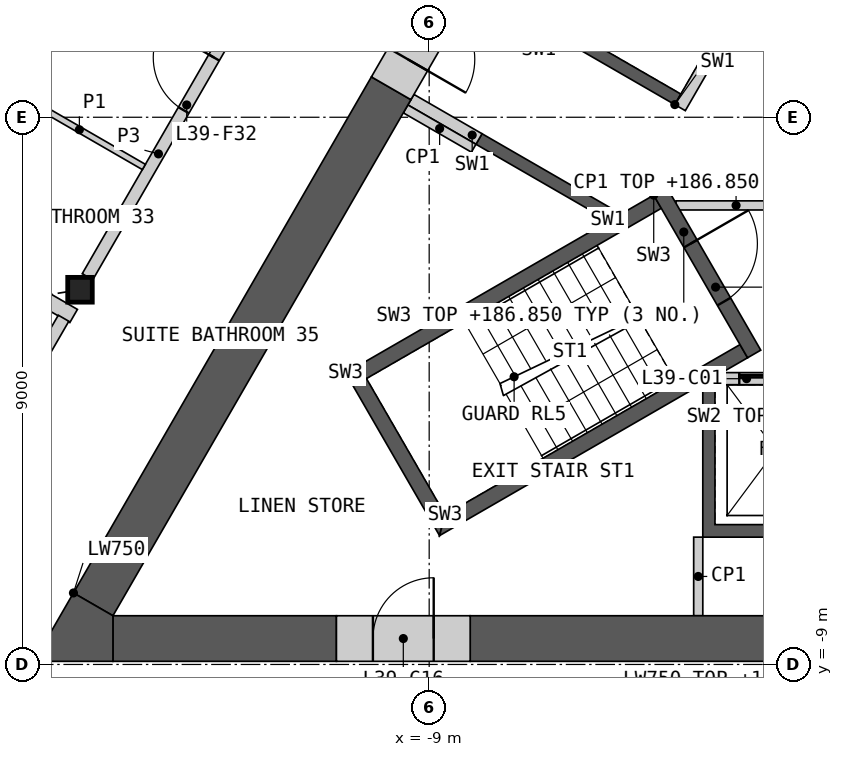
"""IFC4 building model, lengths in metres.
Left out: names, types, materials, properties, quantities, classifications, styles, units other than length and angle.
Written with IfcOpenShell. Run it as: python <this file> out.ifc"""

import sys

from ifc_helpers import new_model, si_unit, direction, frame, frame_2d, origin, origin_2d, place, context, subcontext, project, spatial, polyline, rectangle, i_section, outline, extrude, element, fill, save


model = new_model("IFC4")
c1 = context("Model", 3, precision=1e-05, world=origin(), true_north=direction((0.0, 1.0)))
c2 = subcontext(c1, "Body", "Model", "MODEL_VIEW")
j1 = project(units=[si_unit("LENGTHUNIT", "METRE"), si_unit("PLANEANGLEUNIT", "RADIAN")], contexts=[c1])
p1 = place(None, origin())
s1 = spatial("IfcSite", under=j1, at=p1, CompositionType="ELEMENT")
p2 = place(p1, origin())
s2 = spatial("IfcBuilding", under=s1, at=p2, CompositionType="ELEMENT")
p3 = place(p2, frame((0.0, 0.0, 183.6)))
s3 = spatial("IfcBuildingStorey", under=s2, at=p3, CompositionType="ELEMENT", Elevation=183.6)
p4 = place(p3, frame((-14.743, -2.837, 0.0), z_axis=(0.0, 0.0, 1.0), x_axis=(1.0, 0.0, 0.0)))
e1 = element("IfcColumn", 1, at=p4, inside=s3, PredefinedType="COLUMN", context=c2, shape_type="SweptSolid", body=[
    extrude(i_section(OverallWidth=0.404, OverallDepth=0.407, WebThickness=0.027, FlangeThickness=0.044, at=origin_2d()), origin(), (0.0, 0.0, 1.0), 3.6),
])
p5 = place(p3, origin())
e2 = element("IfcWall", 2, at=p5, inside=s3, PredefinedType="SHEAR", context=c2, shape_type="SweptSolid", body=[
    extrude(outline(polyline([(0.1, -4.4), (0.1, -6.906), (-4.5, -6.906), (-4.5, -4.4), (-4.3, -4.4), (-4.3, -6.7), (-2.3, -6.7), (-2.3, -4.4), (-2.1, -4.4), (-2.1, -6.7), (-0.1, -6.7), (-0.1, -4.4), (0.1, -4.4)])), origin(), (0.0, 0.0, 1.0), 3.25),
])
p6 = place(p3, frame((-4.187, -4.3, 0.0), z_axis=(0.0, 0.0, 1.0), x_axis=(1.0, 0.0, 0.0)))
e3 = element("IfcWall", 3, at=p6, inside=s3, PredefinedType="SOLIDWALL", context=c2, shape_type="SweptSolid", body=[
    extrude(rectangle(XDim=8.373, YDim=0.2, at=frame_2d((4.187, 0.0))), origin(), (0.0, 0.0, 1.0), 3.25),
])
p7 = place(p6, frame((0.287, 0.0, 0.0)))
e4 = element("IfcOpeningElement", 4, at=p7, cuts=e3, PredefinedType="OPENING", context=c2, shape_type="SweptSolid", body=[
    extrude(rectangle(XDim=1.2, YDim=2.1, at=frame_2d((0.6, 1.05))), frame((0.0, 0.11, 0.0), z_axis=(0.0, -1.0, 0.0), x_axis=(1.0, 0.0, 0.0)), (0.0, 0.0, 1.0), 0.22),
])
p8 = place(p6, frame((2.387, 0.0, 0.0)))
e5 = element("IfcOpeningElement", 5, at=p8, cuts=e3, PredefinedType="OPENING", context=c2, shape_type="SweptSolid", body=[
    extrude(rectangle(XDim=1.4, YDim=2.1, at=frame_2d((0.7, 1.05))), frame((0.0, 0.11, 0.0), z_axis=(0.0, -1.0, 0.0), x_axis=(1.0, 0.0, 0.0)), (0.0, 0.0, 1.0), 0.22),
])
p9 = place(p6, frame((4.837, 0.0, 0.0)))
e6 = element("IfcOpeningElement", 6, at=p9, cuts=e3, PredefinedType="OPENING", context=c2, shape_type="SweptSolid", body=[
    extrude(rectangle(XDim=0.9, YDim=2.1, at=frame_2d((0.45, 1.05))), frame((0.0, 0.11, 0.0), z_axis=(0.0, -1.0, 0.0), x_axis=(1.0, 0.0, 0.0)), (0.0, 0.0, 1.0), 0.22),
])
p10 = place(p6, frame((6.887, 0.0, 0.0)))
e7 = element("IfcOpeningElement", 7, at=p10, cuts=e3, PredefinedType="OPENING", context=c2, shape_type="SweptSolid", body=[
    extrude(rectangle(XDim=1.2, YDim=2.1, at=frame_2d((0.6, 1.05))), frame((0.0, 0.11, 0.0), z_axis=(0.0, -1.0, 0.0), x_axis=(1.0, 0.0, 0.0)), (0.0, 0.0, 1.0), 0.22),
])
p11 = place(p3, origin())
e8 = element("IfcWall", 8, at=p11, inside=s3, PredefinedType="SHEAR", context=c2, shape_type="SweptSolid", body=[
    extrude(outline(polyline([(-6.061, -1.697), (-8.231, -0.444), (-8.131, -0.271), (-5.96, -1.524), (-6.061, -1.697)])), origin(), (0.0, 0.0, 1.0), 3.25),
])
p12 = place(p3, origin())
e9 = element("IfcWall", 9, at=p12, inside=s3, PredefinedType="SHEAR", context=c2, shape_type="SweptSolid", body=[
    extrude(outline(polyline([(-4.96, 0.208), (-7.131, 1.461), (-3.731, 7.35), (-1.561, 6.097), (-1.66, 5.924), (-3.652, 7.074), (-4.652, 5.342), (-2.66, 4.192), (-2.76, 4.019), (-4.752, 5.169), (-5.752, 3.437), (-3.76, 2.287), (-3.861, 2.113), (-5.852, 3.263), (-6.852, 1.531), (-4.861, 0.381), (-4.96, 0.208)])), origin(), (0.0, 0.0, 1.0), 3.25),
])
p13 = place(p3, frame((-1.631, 5.776, 0.0), z_axis=(0.0, 0.0, 1.0), x_axis=(-0.499992876559, -0.866029516466, 0.0)))
e10 = element("IfcWall", 10, at=p13, inside=s3, PredefinedType="SOLIDWALL", context=c2, shape_type="SweptSolid", body=[
    extrude(rectangle(XDim=6.486, YDim=0.2, at=frame_2d((3.243, 0.0))), origin(), (0.0, 0.0, 1.0), 3.25),
])
p14 = place(p13, frame((0.337, 0.0, 0.0)))
e11 = element("IfcOpeningElement", 11, at=p14, cuts=e10, PredefinedType="OPENING", context=c2, shape_type="SweptSolid", body=[
    extrude(rectangle(XDim=1.1, YDim=2.1, at=frame_2d((0.55, 1.05))), frame((0.0, 0.11, 0.0), z_axis=(0.0, -1.0, 0.0), x_axis=(1.0, 0.0, 0.0)), (0.0, 0.0, 1.0), 0.22),
])
p15 = place(p13, frame((2.537, 0.0, 0.0)))
e12 = element("IfcOpeningElement", 12, at=p15, cuts=e10, PredefinedType="OPENING", context=c2, shape_type="SweptSolid", body=[
    extrude(rectangle(XDim=1.1, YDim=2.1, at=frame_2d((0.55, 1.05))), frame((0.0, 0.11, 0.0), z_axis=(0.0, -1.0, 0.0), x_axis=(1.0, 0.0, 0.0)), (0.0, 0.0, 1.0), 0.22),
])
p16 = place(p3, frame((-8.181, -0.357, 0.0), z_axis=(0.0, 0.0, 1.0), x_axis=(-0.866003189247, 0.500038474733, 0.0)))
e13 = element("IfcWall", 13, at=p16, inside=s3, PredefinedType="SHEAR", context=c2, shape_type="SweptSolid", body=[
    extrude(rectangle(XDim=1.293, YDim=0.2, at=frame_2d((0.646, 0.0))), origin(), (0.0, 0.0, 1.0), 3.25),
])
p17 = place(p3, frame((-4.941, -1.45, 0.0), z_axis=(0.0, 0.0, 1.0), x_axis=(1.0, 0.0, 0.0)))
e14 = element("IfcWall", 14, at=p17, inside=s3, PredefinedType="PARTITIONING", context=c2, shape_type="SweptSolid", body=[
    extrude(rectangle(XDim=9.882, YDim=0.15, at=frame_2d((4.941, 0.0))), origin(), (0.0, 0.0, 1.0), 3.25),
])
p18 = place(p17, frame((4.391, 0.0, 0.0)))
e15 = element("IfcOpeningElement", 15, at=p18, cuts=e14, PredefinedType="OPENING", context=c2, shape_type="SweptSolid", body=[
    extrude(rectangle(XDim=1.1, YDim=2.1, at=frame_2d((0.55, 1.05))), frame((0.0, 0.085, 0.0), z_axis=(0.0, -1.0, 0.0), x_axis=(1.0, 0.0, 0.0)), (0.0, 0.0, 1.0), 0.17),
])
p19 = place(p3, origin())
e16 = element("IfcWall", 16, at=p19, inside=s3, PredefinedType="SHEAR", context=c2, shape_type="SweptSolid", body=[
    extrude(outline(polyline([(-5.307, -1.281), (-10.374, -4.206), (-10.032, -4.298), (-5.182, -1.498), (-5.307, -1.281)])), origin(), (0.0, 0.0, 1.0), 3.25),
])
p20 = place(p3, origin())
e17 = element("IfcWall", 17, at=p20, inside=s3, PredefinedType="SHEAR", context=c2, shape_type="SweptSolid", body=[
    extrude(outline(polyline([(-10.374, -4.206), (-8.83, -6.881), (-8.738, -6.539), (-10.032, -4.298), (-10.374, -4.206)])), origin(), (0.0, 0.0, 1.0), 3.25),
])
p21 = place(p3, origin())
e18 = element("IfcWall", 18, at=p21, inside=s3, PredefinedType="SHEAR", context=c2, shape_type="SweptSolid", body=[
    extrude(outline(polyline([(-8.738, -6.539), (-8.83, -6.881), (-3.763, -3.956), (-3.888, -3.739), (-8.738, -6.539)])), origin(), (0.0, 0.0, 1.0), 3.25),
])
p22 = place(p3, frame((-5.199, -1.219, 0.0), z_axis=(0.0, 0.0, 1.0), x_axis=(0.499982516597, -0.866035497597, 0.0)))
e19 = element("IfcWall", 19, at=p22, inside=s3, PredefinedType="SHEAR", context=c2, shape_type="SweptSolid", body=[
    extrude(rectangle(XDim=3.088, YDim=0.25, at=frame_2d((1.544, 0.0))), origin(), (0.0, 0.0, 1.0), 3.25),
])
p23 = place(p22, frame((0.994, 0.0, 0.0)))
e20 = element("IfcOpeningElement", 20, at=p23, cuts=e19, PredefinedType="OPENING", context=c2, shape_type="SweptSolid", body=[
    extrude(rectangle(XDim=1.1, YDim=2.1, at=frame_2d((0.55, 1.05))), frame((0.0, 0.135, 0.0), z_axis=(0.0, -1.0, 0.0), x_axis=(1.0, 0.0, 0.0)), (0.0, 0.0, 1.0), 0.27),
])
for number, where, z_axis, x_axis in (
    (21, (-4.575, -6.906, 0.0), (0.0, 0.0, 1.0), (0.0, -1.0, 0.0)),
    (22, (-8.268, -0.509, 0.0), (0.0, 0.0, 1.0), (-0.866, 0.5, 0.0)),
):
    element("IfcWall", number, at=place(p3, frame(where, z_axis=z_axis, x_axis=x_axis)), inside=s3, PredefinedType="PARTITIONING", context=c2, shape_type="SweptSolid", body=[
        extrude(rectangle(XDim=1.293, YDim=0.15, at=frame_2d((0.646, 0.0))), origin(), (0.0, 0.0, 1.0), 3.25),
    ])
p24 = place(p3, frame((-8.325, -8.574, 0.0), z_axis=(0.0, 0.0, 1.0), x_axis=(1.0, 0.0, 0.0)))
e23 = element("IfcWall", 23, at=p24, inside=s3, PredefinedType="SHEAR", context=c2, shape_type="SweptSolid", body=[
    extrude(rectangle(XDim=4.926, YDim=0.75, at=frame_2d((2.463, 0.0))), origin(), (0.0, 0.0, 1.0), 3.25),
])
p25 = place(p3, frame((-14.201, -8.574, 0.0), z_axis=(0.0, 0.0, 1.0), x_axis=(1.0, 0.0, 0.0)))
e24 = element("IfcWall", 24, at=p25, inside=s3, PredefinedType="SHEAR", context=c2, shape_type="SweptSolid", body=[
    extrude(rectangle(XDim=3.676, YDim=0.75, at=frame_2d((1.838, 0.0))), origin(), (0.0, 0.0, 1.0), 3.25),
])
p26 = place(p3, frame((-9.625, 0.477, 0.0), z_axis=(0.0, 0.0, 1.0), x_axis=(-0.499986234705, -0.866033351035, 0.0)))
e25 = element("IfcWall", 25, at=p26, inside=s3, PredefinedType="SHEAR", context=c2, shape_type="SweptSolid", body=[
    extrude(rectangle(XDim=9.801, YDim=0.75, at=frame_2d((4.9, 0.0))), origin(), (0.0, 0.0, 1.0), 3.25),
])
p27 = place(p3, origin())
e26 = element("IfcWall", 26, at=p27, inside=s3, PredefinedType="SHEAR", context=c2, shape_type="SweptSolid", body=[
    extrude(outline(polyline([(-14.851, -7.824), (-14.201, -8.199), (-14.201, -8.949), (-15.5, -8.949), (-14.851, -7.824)])), origin(), (0.0, 0.0, 1.0), 3.25),
])
p28 = place(p3, frame((-10.525, -8.574, 0.0), z_axis=(0.0, 0.0, 1.0), x_axis=(1.0, 0.0, 0.0)))
e27 = element("IfcWall", 27, at=p28, inside=s3, PredefinedType="SHEAR", context=c2, shape_type="SweptSolid", body=[
    extrude(rectangle(XDim=2.2, YDim=0.75, at=frame_2d((1.1, 0.0))), origin(), (0.0, 0.0, 1.0), 3.25),
])
p29 = place(p28, frame((0.6, 0.0, 0.0)))
e28 = element("IfcOpeningElement", 28, at=p29, cuts=e27, PredefinedType="OPENING", context=c2, shape_type="SweptSolid", body=[
    extrude(rectangle(XDim=1.0, YDim=2.1, at=frame_2d((0.5, 1.05))), frame((0.0, 0.385, 0.0), z_axis=(0.0, -1.0, 0.0), x_axis=(1.0, 0.0, 0.0)), (0.0, 0.0, 1.0), 0.77),
])
p30 = place(p3, frame((-8.525, 2.382, 0.0), z_axis=(0.0, 0.0, 1.0), x_axis=(-0.500077893725, -0.86598042715, 0.0)))
e29 = element("IfcWall", 29, at=p30, inside=s3, PredefinedType="SHEAR", context=c2, shape_type="SweptSolid", body=[
    extrude(rectangle(XDim=2.2, YDim=0.75, at=frame_2d((1.1, 0.0))), origin(), (0.0, 0.0, 1.0), 3.25),
])
p31 = place(p30, frame((0.55, 0.0, 0.0)))
e30 = element("IfcOpeningElement", 30, at=p31, cuts=e29, PredefinedType="OPENING", context=c2, shape_type="SweptSolid", body=[
    extrude(rectangle(XDim=1.1, YDim=2.1, at=frame_2d((0.55, 1.05))), frame((0.0, 0.385, 0.0), z_axis=(0.0, -1.0, 0.0), x_axis=(1.0, 0.0, 0.0)), (0.0, 0.0, 1.0), 0.77),
])
p32 = place(p3, frame((-26.164, 3.265, 0.0), z_axis=(0.0, 0.0, 1.0), x_axis=(0.866021313335, -0.500007084799, 0.0)))
e31 = element("IfcWall", 31, at=p32, inside=s3, PredefinedType="PARTITIONING", context=c2, shape_type="SweptSolid", body=[
    extrude(rectangle(XDim=13.068, YDim=0.25, at=frame_2d((6.534, 0.0))), origin(), (0.0, 0.0, 1.0), 2.404),
])
p33 = place(p3, frame((-14.619, -2.624, 0.0), z_axis=(0.0, 0.0, 1.0), x_axis=(0.50000393355, 0.866023132736, 0.0)))
e32 = element("IfcWall", 32, at=p33, inside=s3, PredefinedType="PARTITIONING", context=c2, shape_type="SweptSolid", body=[
    extrude(rectangle(XDim=9.335, YDim=0.2, at=frame_2d((4.667, 0.0))), origin(), (0.0, 0.0, 1.0), 3.25),
])
p34 = place(p33, frame((4.77, 0.0, 0.0)))
e33 = element("IfcOpeningElement", 33, at=p34, cuts=e32, PredefinedType="OPENING", context=c2, shape_type="SweptSolid", body=[
    extrude(rectangle(XDim=1.0, YDim=2.1, at=frame_2d((0.5, 1.05))), frame((0.0, 0.11, 0.0), z_axis=(0.0, -1.0, 0.0), x_axis=(1.0, 0.0, 0.0)), (0.0, 0.0, 1.0), 0.22),
])
p35 = place(p33, frame((3.163, 0.0, 0.0)))
e34 = element("IfcOpeningElement", 34, at=p35, cuts=e32, PredefinedType="OPENING", context=c2, shape_type="SweptSolid", body=[
    extrude(rectangle(XDim=1.0, YDim=2.1, at=frame_2d((0.5, 1.05))), frame((0.0, 0.11, 0.0), z_axis=(0.0, -1.0, 0.0), x_axis=(1.0, 0.0, 0.0)), (0.0, 0.0, 1.0), 0.22),
])
p36 = place(p3, frame((-17.744, -8.035, 0.0), z_axis=(0.0, 0.0, 1.0), x_axis=(0.49998041698, 0.866036709751, 0.0)))
e35 = element("IfcWall", 35, at=p36, inside=s3, PredefinedType="PARTITIONING", context=c2, shape_type="SweptSolid", body=[
    extrude(rectangle(XDim=5.462, YDim=0.2, at=frame_2d((2.731, 0.0))), origin(), (0.0, 0.0, 1.0), 3.25),
])
p37 = place(p36, frame((0.352, 0.0, 0.0)))
e36 = element("IfcOpeningElement", 36, at=p37, cuts=e35, PredefinedType="OPENING", context=c2, shape_type="SweptSolid", body=[
    extrude(rectangle(XDim=1.1, YDim=2.1, at=frame_2d((0.55, 1.05))), frame((0.0, 0.11, 0.0), z_axis=(0.0, -1.0, 0.0), x_axis=(1.0, 0.0, 0.0)), (0.0, 0.0, 1.0), 0.22),
])
p38 = place(p3, frame((-15.814, 0.407, 0.0), z_axis=(0.0, 0.0, 1.0), x_axis=(0.866057815567, -0.499943856944, 0.0)))
e37 = element("IfcWall", 37, at=p38, inside=s3, PredefinedType="PARTITIONING", context=c2, shape_type="SweptSolid", body=[
    extrude(rectangle(XDim=2.45, YDim=0.1, at=frame_2d((1.225, 0.0))), origin(), (0.0, 0.0, 1.0), 2.404),
])
p39 = place(p7, origin())
e38 = element("IfcDoor", 38, at=p39, inside=s3, OperationType="SLIDING_TO_LEFT", PredefinedType="DOOR", context=c2, shape_type="SweptSolid", body=[
    extrude(rectangle(XDim=1.2, YDim=2.1, at=frame_2d((0.6, 1.05))), frame((0.0, 0.025, 0.0), z_axis=(0.0, -1.0, 0.0), x_axis=(1.0, 0.0, 0.0)), (0.0, 0.0, 1.0), 0.05),
])
fill(e4, e38)
p40 = place(p23, origin())
e39 = element("IfcDoor", 39, at=p40, inside=s3, OperationType="SINGLE_SWING_LEFT", PredefinedType="DOOR", context=c2, shape_type="SweptSolid", body=[
    extrude(rectangle(XDim=1.1, YDim=2.1, at=frame_2d((0.55, 1.05))), frame((0.0, 0.025, 0.0), z_axis=(0.0, -1.0, 0.0), x_axis=(1.0, 0.0, 0.0)), (0.0, 0.0, 1.0), 0.05),
])
fill(e20, e39)
p41 = place(p29, origin())
e40 = element("IfcDoor", 40, at=p41, inside=s3, OperationType="SINGLE_SWING_RIGHT", PredefinedType="DOOR", context=c2, shape_type="SweptSolid", body=[
    extrude(rectangle(XDim=1.0, YDim=2.1, at=frame_2d((0.5, 1.05))), frame((0.0, 0.13, 0.0), z_axis=(0.0, -1.0, 0.0), x_axis=(1.0, 0.0, 0.0)), (0.0, 0.0, 1.0), 0.05),
])
fill(e28, e40)
p42 = place(p31, origin())
e41 = element("IfcDoor", 41, at=p42, inside=s3, OperationType="SINGLE_SWING_RIGHT", PredefinedType="DOOR", context=c2, shape_type="SweptSolid", body=[
    extrude(rectangle(XDim=1.1, YDim=2.1, at=frame_2d((0.55, 1.05))), frame((0.0, 0.13, 0.0), z_axis=(0.0, -1.0, 0.0), x_axis=(1.0, 0.0, 0.0)), (0.0, 0.0, 1.0), 0.05),
])
fill(e30, e41)
p43 = place(p35, origin())
e42 = element("IfcDoor", 42, at=p43, inside=s3, OperationType="SINGLE_SWING_RIGHT", PredefinedType="DOOR", context=c2, shape_type="SweptSolid", body=[
    extrude(rectangle(XDim=1.0, YDim=2.1, at=frame_2d((0.5, 1.05))), frame((0.0, 0.025, 0.0), z_axis=(0.0, -1.0, 0.0), x_axis=(1.0, 0.0, 0.0)), (0.0, 0.0, 1.0), 0.05),
])
fill(e34, e42)
save(model, sys.argv[1])
